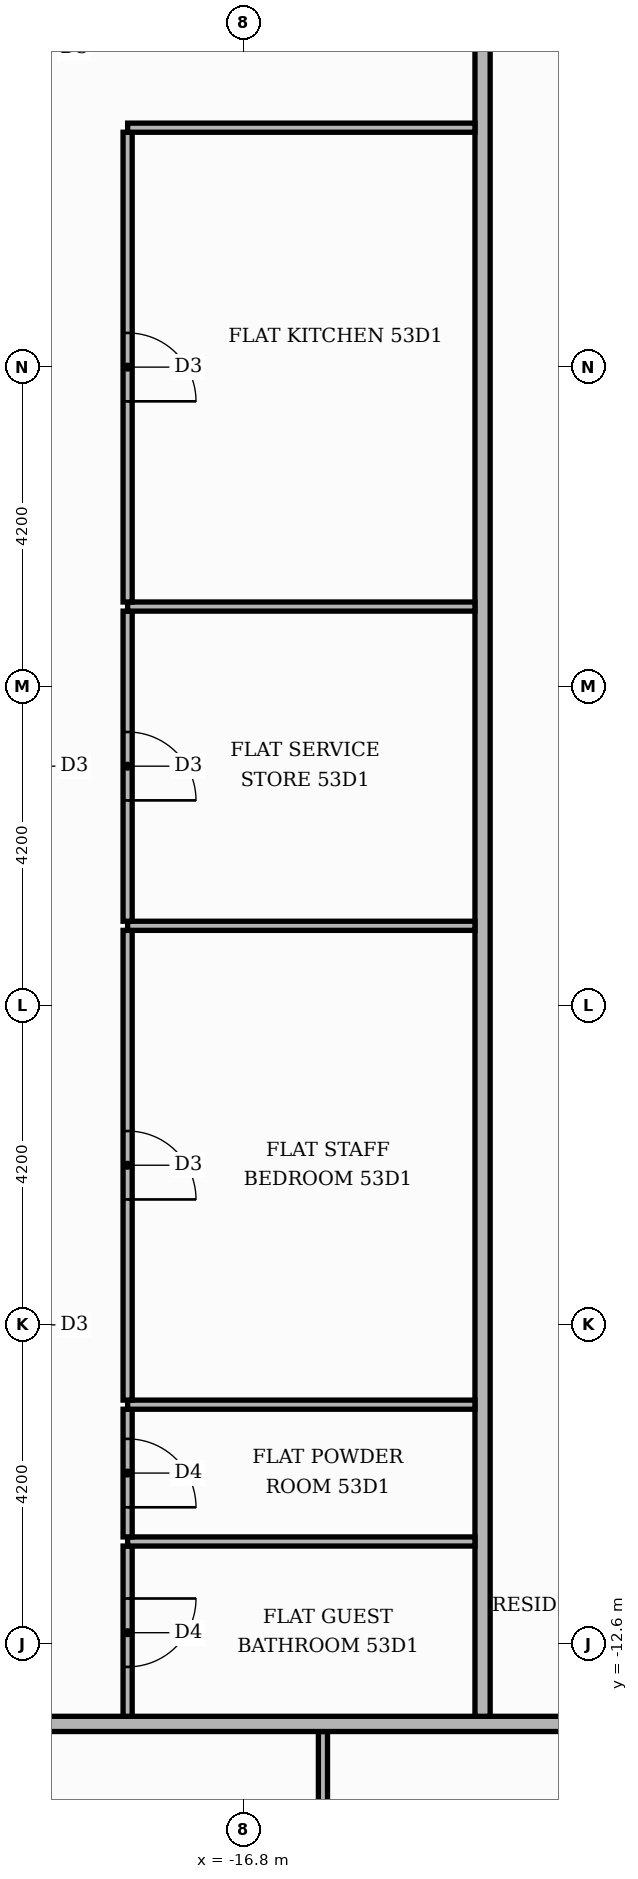
"""IFC4 building model, lengths in metres.
Left out: names, types, materials, properties, quantities, classifications, styles, units other than length and angle.
Written with IfcOpenShell. Run it as: python <this file> out.ifc"""

import sys

from ifc_helpers import new_model, si_unit, direction, frame, frame_2d, origin, place, context, subcontext, project, spatial, rectangle, extrude, element, fill, save


model = new_model("IFC4")
c1 = context("Model", 3, precision=1e-05, world=origin(), true_north=direction((0.0, 1.0)))
c2 = subcontext(c1, "Body", "Model", "MODEL_VIEW")
j1 = project(units=[si_unit("LENGTHUNIT", "METRE"), si_unit("PLANEANGLEUNIT", "RADIAN")], contexts=[c1])
p1 = place(None, origin())
s1 = spatial("IfcSite", under=j1, at=p1, CompositionType="ELEMENT")
p2 = place(p1, origin())
s2 = spatial("IfcBuilding", under=s1, at=p2, CompositionType="ELEMENT")
p3 = place(p2, frame((0.0, 0.0, 223.5)))
s3 = spatial("IfcBuildingStorey", under=s2, at=p3, CompositionType="ELEMENT", Elevation=223.5)
p4 = place(p3, frame((-15.75, -20.06, 0.0), z_axis=(0.0, 0.0, 1.0), x_axis=(0.0, 1.0, 0.0)))
e1 = element("IfcWall", 1, at=p4, inside=s3, PredefinedType="PARTITIONING", context=c2, shape_type="SweptSolid", body=[
    extrude(rectangle(XDim=6.31, YDim=0.12, at=frame_2d((3.155, 0.0))), origin(), (0.0, 0.0, 1.0), 3.48),
])
p5 = place(p4, frame((2.675, 0.0, 0.0)))
e2 = element("IfcOpeningElement", 2, at=p5, cuts=e1, PredefinedType="OPENING", context=c2, shape_type="SweptSolid", body=[
    extrude(rectangle(XDim=1.0, YDim=2.1, at=frame_2d((0.5, 1.05))), frame((0.0, 0.07, 0.0), z_axis=(0.0, -1.0, 0.0), x_axis=(1.0, 0.0, 0.0)), (0.0, 0.0, 1.0), 0.14),
])
p6 = place(p3, frame((-25.42, -13.65, 0.0), z_axis=(0.0, 0.0, 1.0), x_axis=(1.0, 0.0, 0.0)))
e3 = element("IfcWall", 3, at=p6, inside=s3, PredefinedType="PARTITIONING", context=c2, shape_type="SweptSolid", body=[
    extrude(rectangle(XDim=39.07, YDim=0.2, at=frame_2d((19.535, 0.0))), origin(), (0.0, 0.0, 1.0), 3.48),
])
p7 = place(p6, frame((13.32, 0.0, 0.0)))
e4 = element("IfcOpeningElement", 4, at=p7, cuts=e3, PredefinedType="OPENING", context=c2, shape_type="SweptSolid", body=[
    extrude(rectangle(XDim=1.1, YDim=2.4, at=frame_2d((0.55, 1.2))), frame((0.0, 0.11, 0.0), z_axis=(0.0, -1.0, 0.0), x_axis=(1.0, 0.0, 0.0)), (0.0, 0.0, 1.0), 0.22),
])
p8 = place(p6, frame((23.82, 0.0, 0.0)))
e5 = element("IfcOpeningElement", 5, at=p8, cuts=e3, PredefinedType="OPENING", context=c2, shape_type="SweptSolid", body=[
    extrude(rectangle(XDim=1.1, YDim=2.4, at=frame_2d((0.55, 1.2))), frame((0.0, 0.11, 0.0), z_axis=(0.0, -1.0, 0.0), x_axis=(1.0, 0.0, 0.0)), (0.0, 0.0, 1.0), 0.22),
])
p9 = place(p3, frame((-18.32, -13.55, 0.0), z_axis=(0.0, 0.0, 1.0), x_axis=(0.0, 1.0, 0.0)))
e6 = element("IfcWall", 6, at=p9, inside=s3, PredefinedType="PARTITIONING", context=c2, shape_type="SweptSolid", body=[
    extrude(rectangle(XDim=2.24, YDim=0.12, at=frame_2d((1.12, 0.0))), origin(), (0.0, 0.0, 1.0), 3.48),
])
p10 = place(p9, frame((0.65, 0.0, 0.0)))
e7 = element("IfcOpeningElement", 7, at=p10, cuts=e6, PredefinedType="OPENING", context=c2, shape_type="SweptSolid", body=[
    extrude(rectangle(XDim=0.9, YDim=2.1, at=frame_2d((0.45, 1.05))), frame((0.0, 0.07, 0.0), z_axis=(0.0, -1.0, 0.0), x_axis=(1.0, 0.0, 0.0)), (0.0, 0.0, 1.0), 0.14),
])
p11 = place(p3, frame((-13.65, -13.55, 0.0), z_axis=(0.0, 0.0, 1.0), x_axis=(0.0, 1.0, 0.0)))
e8 = element("IfcWall", 8, at=p11, inside=s3, PredefinedType="PARTITIONING", context=c2, shape_type="SweptSolid", body=[
    extrude(rectangle(XDim=27.1, YDim=0.2, at=frame_2d((13.55, 0.0))), origin(), (0.0, 0.0, 1.0), 3.48),
])
p12 = place(p11, frame((23.5, 0.0, 0.0)))
e9 = element("IfcOpeningElement", 9, at=p12, cuts=e8, PredefinedType="OPENING", context=c2, shape_type="SweptSolid", body=[
    extrude(rectangle(XDim=1.1, YDim=2.4, at=frame_2d((0.55, 1.2))), frame((0.0, 0.11, 0.0), z_axis=(0.0, -1.0, 0.0), x_axis=(1.0, 0.0, 0.0)), (0.0, 0.0, 1.0), 0.22),
])
p13 = place(p3, frame((-18.32, -11.25, 0.0), z_axis=(0.0, 0.0, 1.0), x_axis=(1.0, 0.0, 0.0)))
e10 = element("IfcWall", 10, at=p13, inside=s3, PredefinedType="PARTITIONING", context=c2, shape_type="SweptSolid", body=[
    extrude(rectangle(XDim=4.57, YDim=0.12, at=frame_2d((2.285, 0.0))), origin(), (0.0, 0.0, 1.0), 3.48),
])
p14 = place(p3, frame((-18.32, -11.19, 0.0), z_axis=(0.0, 0.0, 1.0), x_axis=(0.0, 1.0, 0.0)))
e11 = element("IfcWall", 11, at=p14, inside=s3, PredefinedType="PARTITIONING", context=c2, shape_type="SweptSolid", body=[
    extrude(rectangle(XDim=1.68, YDim=0.12, at=frame_2d((0.84, 0.0))), origin(), (0.0, 0.0, 1.0), 3.48),
])
p15 = place(p14, frame((0.39, 0.0, 0.0)))
e12 = element("IfcOpeningElement", 12, at=p15, cuts=e11, PredefinedType="OPENING", context=c2, shape_type="SweptSolid", body=[
    extrude(rectangle(XDim=0.9, YDim=2.1, at=frame_2d((0.45, 1.05))), frame((0.0, 0.07, 0.0), z_axis=(0.0, -1.0, 0.0), x_axis=(1.0, 0.0, 0.0)), (0.0, 0.0, 1.0), 0.14),
])
p16 = place(p3, frame((-18.32, -9.45, 0.0), z_axis=(0.0, 0.0, 1.0), x_axis=(1.0, 0.0, 0.0)))
e13 = element("IfcWall", 13, at=p16, inside=s3, PredefinedType="PARTITIONING", context=c2, shape_type="SweptSolid", body=[
    extrude(rectangle(XDim=4.57, YDim=0.12, at=frame_2d((2.285, 0.0))), origin(), (0.0, 0.0, 1.0), 3.48),
])
p17 = place(p3, frame((-18.32, -9.39, 0.0), z_axis=(0.0, 0.0, 1.0), x_axis=(0.0, 1.0, 0.0)))
e14 = element("IfcWall", 14, at=p17, inside=s3, PredefinedType="PARTITIONING", context=c2, shape_type="SweptSolid", body=[
    extrude(rectangle(XDim=6.18, YDim=0.12, at=frame_2d((3.09, 0.0))), origin(), (0.0, 0.0, 1.0), 3.48),
])
p18 = place(p17, frame((2.64, 0.0, 0.0)))
e15 = element("IfcOpeningElement", 15, at=p18, cuts=e14, PredefinedType="OPENING", context=c2, shape_type="SweptSolid", body=[
    extrude(rectangle(XDim=0.9, YDim=2.1, at=frame_2d((0.45, 1.05))), frame((0.0, 0.07, 0.0), z_axis=(0.0, -1.0, 0.0), x_axis=(1.0, 0.0, 0.0)), (0.0, 0.0, 1.0), 0.14),
])
p19 = place(p3, frame((-18.32, -3.15, 0.0), z_axis=(0.0, 0.0, 1.0), x_axis=(1.0, 0.0, 0.0)))
e16 = element("IfcWall", 16, at=p19, inside=s3, PredefinedType="PARTITIONING", context=c2, shape_type="SweptSolid", body=[
    extrude(rectangle(XDim=4.57, YDim=0.12, at=frame_2d((2.285, 0.0))), origin(), (0.0, 0.0, 1.0), 3.48),
])
p20 = place(p3, frame((-18.32, -3.09, 0.0), z_axis=(0.0, 0.0, 1.0), x_axis=(0.0, 1.0, 0.0)))
e17 = element("IfcWall", 17, at=p20, inside=s3, PredefinedType="PARTITIONING", context=c2, shape_type="SweptSolid", body=[
    extrude(rectangle(XDim=4.08, YDim=0.12, at=frame_2d((2.04, 0.0))), origin(), (0.0, 0.0, 1.0), 3.48),
])
p21 = place(p20, frame((1.59, 0.0, 0.0)))
e18 = element("IfcOpeningElement", 18, at=p21, cuts=e17, PredefinedType="OPENING", context=c2, shape_type="SweptSolid", body=[
    extrude(rectangle(XDim=0.9, YDim=2.1, at=frame_2d((0.45, 1.05))), frame((0.0, 0.07, 0.0), z_axis=(0.0, -1.0, 0.0), x_axis=(1.0, 0.0, 0.0)), (0.0, 0.0, 1.0), 0.14),
])
p22 = place(p3, frame((-18.32, 1.05, 0.0), z_axis=(0.0, 0.0, 1.0), x_axis=(1.0, 0.0, 0.0)))
e19 = element("IfcWall", 19, at=p22, inside=s3, PredefinedType="PARTITIONING", context=c2, shape_type="SweptSolid", body=[
    extrude(rectangle(XDim=4.57, YDim=0.12, at=frame_2d((2.285, 0.0))), origin(), (0.0, 0.0, 1.0), 3.48),
])
p23 = place(p3, frame((-18.32, 1.11, 0.0), z_axis=(0.0, 0.0, 1.0), x_axis=(0.0, 1.0, 0.0)))
e20 = element("IfcWall", 20, at=p23, inside=s3, PredefinedType="PARTITIONING", context=c2, shape_type="SweptSolid", body=[
    extrude(rectangle(XDim=6.18, YDim=0.12, at=frame_2d((3.09, 0.0))), origin(), (0.0, 0.0, 1.0), 3.48),
])
p24 = place(p23, frame((2.64, 0.0, 0.0)))
e21 = element("IfcOpeningElement", 21, at=p24, cuts=e20, PredefinedType="OPENING", context=c2, shape_type="SweptSolid", body=[
    extrude(rectangle(XDim=0.9, YDim=2.1, at=frame_2d((0.45, 1.05))), frame((0.0, 0.07, 0.0), z_axis=(0.0, -1.0, 0.0), x_axis=(1.0, 0.0, 0.0)), (0.0, 0.0, 1.0), 0.14),
])
p25 = place(p3, frame((-18.32, 7.35, 0.0), z_axis=(0.0, 0.0, 1.0), x_axis=(1.0, 0.0, 0.0)))
e22 = element("IfcWall", 22, at=p25, inside=s3, PredefinedType="PARTITIONING", context=c2, shape_type="SweptSolid", body=[
    extrude(rectangle(XDim=4.57, YDim=0.12, at=frame_2d((2.285, 0.0))), origin(), (0.0, 0.0, 1.0), 3.48),
])
p26 = place(p24, frame((0.9, 0.0, 0.0), z_axis=(0.0, 0.0, 1.0), x_axis=(-1.0, 0.0, 0.0)))
e23 = element("IfcDoor", 23, at=p26, inside=s3, OperationType="SINGLE_SWING_LEFT", PredefinedType="DOOR", context=c2, shape_type="SweptSolid", body=[
    extrude(rectangle(XDim=0.9, YDim=2.1, at=frame_2d((0.45, 1.05))), frame((0.0, 0.025, 0.0), z_axis=(0.0, -1.0, 0.0), x_axis=(1.0, 0.0, 0.0)), (0.0, 0.0, 1.0), 0.05),
])
fill(e21, e23)
p27 = place(p21, frame((0.9, 0.0, 0.0), z_axis=(0.0, 0.0, 1.0), x_axis=(-1.0, 0.0, 0.0)))
e24 = element("IfcDoor", 24, at=p27, inside=s3, OperationType="SINGLE_SWING_LEFT", PredefinedType="DOOR", context=c2, shape_type="SweptSolid", body=[
    extrude(rectangle(XDim=0.9, YDim=2.1, at=frame_2d((0.45, 1.05))), frame((0.0, 0.025, 0.0), z_axis=(0.0, -1.0, 0.0), x_axis=(1.0, 0.0, 0.0)), (0.0, 0.0, 1.0), 0.05),
])
fill(e18, e24)
p28 = place(p18, frame((0.9, 0.0, 0.0), z_axis=(0.0, 0.0, 1.0), x_axis=(-1.0, 0.0, 0.0)))
e25 = element("IfcDoor", 25, at=p28, inside=s3, OperationType="SINGLE_SWING_LEFT", PredefinedType="DOOR", context=c2, shape_type="SweptSolid", body=[
    extrude(rectangle(XDim=0.9, YDim=2.1, at=frame_2d((0.45, 1.05))), frame((0.0, 0.025, 0.0), z_axis=(0.0, -1.0, 0.0), x_axis=(1.0, 0.0, 0.0)), (0.0, 0.0, 1.0), 0.05),
])
fill(e15, e25)
p29 = place(p15, frame((0.9, 0.0, 0.0), z_axis=(0.0, 0.0, 1.0), x_axis=(-1.0, 0.0, 0.0)))
e26 = element("IfcDoor", 26, at=p29, inside=s3, OperationType="SINGLE_SWING_LEFT", PredefinedType="DOOR", context=c2, shape_type="SweptSolid", body=[
    extrude(rectangle(XDim=0.9, YDim=2.1, at=frame_2d((0.45, 1.05))), frame((0.0, 0.025, 0.0), z_axis=(0.0, -1.0, 0.0), x_axis=(1.0, 0.0, 0.0)), (0.0, 0.0, 1.0), 0.05),
])
fill(e12, e26)
p30 = place(p10, frame((0.9, 0.0, 0.0), z_axis=(0.0, 0.0, 1.0), x_axis=(-1.0, 0.0, 0.0)))
e27 = element("IfcDoor", 27, at=p30, inside=s3, OperationType="SINGLE_SWING_RIGHT", PredefinedType="DOOR", context=c2, shape_type="SweptSolid", body=[
    extrude(rectangle(XDim=0.9, YDim=2.1, at=frame_2d((0.45, 1.05))), frame((0.0, 0.025, 0.0), z_axis=(0.0, -1.0, 0.0), x_axis=(1.0, 0.0, 0.0)), (0.0, 0.0, 1.0), 0.05),
])
fill(e7, e27)
save(model, sys.argv[1])
